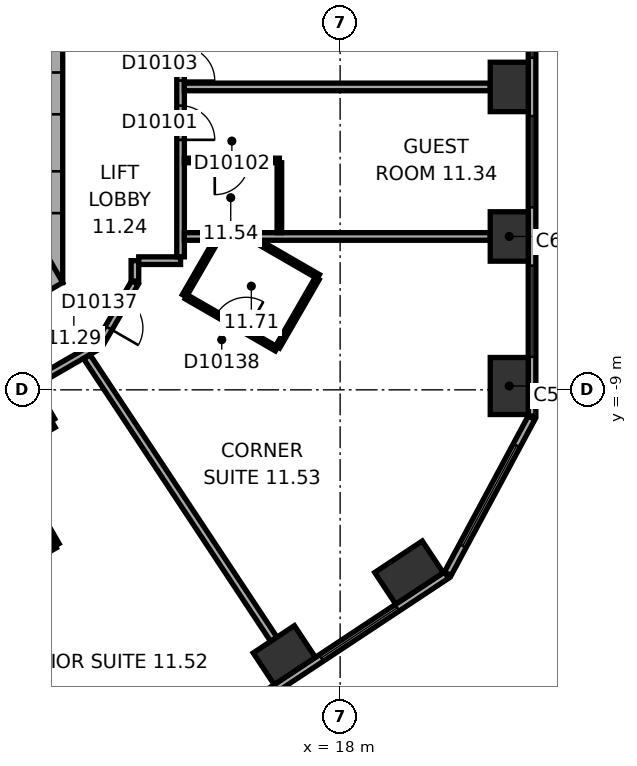
"""IFC4 building model, lengths in metres.
Left out: names, types, materials, properties, quantities, classifications, styles, units other than length and angle.
Written with IfcOpenShell. Run it as: python <this file> out.ifc"""

import sys

from ifc_helpers import new_model, si_unit, direction, frame, frame_2d, origin, origin_2d, place, context, subcontext, project, spatial, rectangle, extrude, element, fill, save


model = new_model("IFC4")
c1 = context("Model", 3, precision=1e-05, world=origin(), true_north=direction((0.0, 1.0)))
c2 = subcontext(c1, "Body", "Model", "MODEL_VIEW")
j1 = project(units=[si_unit("LENGTHUNIT", "METRE"), si_unit("PLANEANGLEUNIT", "RADIAN")], contexts=[c1])
p1 = place(None, origin())
s1 = spatial("IfcSite", under=j1, at=p1, CompositionType="ELEMENT")
p2 = place(p1, origin())
s2 = spatial("IfcBuilding", under=s1, at=p2, CompositionType="ELEMENT")
p3 = place(p2, frame((0.0, 0.0, 57.2)))
s3 = spatial("IfcBuildingStorey", under=s2, at=p3, CompositionType="ELEMENT", Elevation=57.2)
p4 = place(p3, frame((22.45, -8.899, 0.0), z_axis=(0.0, 0.0, 1.0), x_axis=(0.0, 1.0, 0.0)))
e1 = element("IfcColumn", 1, at=p4, inside=s3, PredefinedType="COLUMN", context=c2, shape_type="SweptSolid", body=[
    extrude(rectangle(XDim=1.5, YDim=1.0, at=origin_2d()), origin(), (0.0, 0.0, 1.0), 3.3),
])
for number, where, z_axis, x_axis in (
    (2, (22.45, -4.965, 0.0), (0.0, 0.0, 1.0), (0.0, 1.0, 0.0)),
    (3, (22.45, -1.03, 0.0), (0.0, 0.0, 1.0), (0.0, 1.0, 0.0)),
    (4, (16.531, -15.981, 0.0), (0.0, 0.0, 1.0), (0.834, 0.552, 0.0)),
):
    element("IfcColumn", number, at=place(p3, frame(where, z_axis=z_axis, x_axis=x_axis)), inside=s3, PredefinedType="COLUMN", context=c2, shape_type="SweptSolid", body=[
        extrude(rectangle(XDim=1.3, YDim=1.0, at=origin_2d()), origin(), (0.0, 0.0, 1.0), 3.3),
    ])
p5 = place(p3, frame((19.812, -13.809, 0.0), z_axis=(0.0, 0.0, 1.0), x_axis=(0.833885822067, 0.551936985312, 0.0)))
e5 = element("IfcColumn", 5, at=p5, inside=s3, PredefinedType="COLUMN", context=c2, shape_type="SweptSolid", body=[
    extrude(rectangle(XDim=1.5, YDim=1.0, at=origin_2d()), origin(), (0.0, 0.0, 1.0), 3.3),
])
p6 = place(p3, frame((10.1, -6.177, 0.0), z_axis=(0.0, 0.0, 1.0), x_axis=(0.0, 1.0, 0.0)))
e6 = element("IfcWall", 6, at=p6, inside=s3, PredefinedType="SHEAR", context=c2, shape_type="SweptSolid", body=[
    extrude(rectangle(XDim=12.355, YDim=1.2, at=frame_2d((6.177, 0.0))), origin(), (0.0, 0.0, 1.0), 3.3),
])
p7 = place(p6, frame((6.378, 0.0, 0.0)))
e7 = element("IfcOpeningElement", 7, at=p7, cuts=e6, PredefinedType="OPENING", context=c2, shape_type="SweptSolid", body=[
    extrude(rectangle(XDim=1.5, YDim=2.1, at=frame_2d((0.75, 1.05))), frame((0.0, 0.61, 0.0), z_axis=(0.0, -1.0, 0.0), x_axis=(1.0, 0.0, 0.0)), (0.0, 0.0, 1.0), 1.22),
])
p8 = place(p6, frame((1.828, 0.0, 0.0)))
e8 = element("IfcOpeningElement", 8, at=p8, cuts=e6, PredefinedType="OPENING", context=c2, shape_type="SweptSolid", body=[
    extrude(rectangle(XDim=1.1, YDim=2.1, at=frame_2d((0.55, 1.05))), frame((0.0, 0.61, 0.0), z_axis=(0.0, -1.0, 0.0), x_axis=(1.0, 0.0, 0.0)), (0.0, 0.0, 1.0), 1.22),
])
p9 = place(p6, frame((4.427, 0.0, 0.0)))
e9 = element("IfcOpeningElement", 9, at=p9, cuts=e6, PredefinedType="OPENING", context=c2, shape_type="SweptSolid", body=[
    extrude(rectangle(XDim=1.1, YDim=2.1, at=frame_2d((0.55, 1.05))), frame((0.0, 0.61, 0.0), z_axis=(0.0, -1.0, 0.0), x_axis=(1.0, 0.0, 0.0)), (0.0, 0.0, 1.0), 1.22),
])
p10 = place(p3, frame((-0.3, -11.836, 0.0), z_axis=(0.0, 0.0, 1.0), x_axis=(0.866021384402, 0.500006961711, 0.0)))
e10 = element("IfcWall", 10, at=p10, inside=s3, PredefinedType="SHEAR", context=c2, shape_type="SweptSolid", body=[
    extrude(rectangle(XDim=12.355, YDim=1.2, at=frame_2d((6.178, 0.0))), origin(), (0.0, 0.0, 1.0), 3.3),
])
p11 = place(p10, frame((4.128, 0.0, 0.0)))
e11 = element("IfcOpeningElement", 11, at=p11, cuts=e10, PredefinedType="OPENING", context=c2, shape_type="SweptSolid", body=[
    extrude(rectangle(XDim=0.9, YDim=2.1, at=frame_2d((0.45, 1.05))), frame((0.0, 0.61, 0.0), z_axis=(0.0, -1.0, 0.0), x_axis=(1.0, 0.0, 0.0)), (0.0, 0.0, 1.0), 1.22),
])
p12 = place(p10, frame((7.928, 0.0, 0.0)))
e12 = element("IfcOpeningElement", 12, at=p12, cuts=e10, PredefinedType="OPENING", context=c2, shape_type="SweptSolid", body=[
    extrude(rectangle(XDim=1.1, YDim=2.1, at=frame_2d((0.55, 1.05))), frame((0.0, 0.61, 0.0), z_axis=(0.0, -1.0, 0.0), x_axis=(1.0, 0.0, 0.0)), (0.0, 0.0, 1.0), 1.22),
])
p13 = place(p3, frame((23.05, -9.687, 0.0), z_axis=(0.0, 0.0, 1.0), x_axis=(0.0, 1.0, 0.0)))
e13 = element("IfcWall", 13, at=p13, inside=s3, PredefinedType="STANDARD", context=c2, shape_type="SweptSolid", body=[
    extrude(rectangle(XDim=21.246, YDim=0.2, at=frame_2d((10.623, 0.0))), origin(), (0.0, 0.0, 1.0), 3.3),
])
p14 = place(p13, frame((1.555, 0.0, 0.8)))
e14 = element("IfcOpeningElement", 14, at=p14, cuts=e13, PredefinedType="OPENING", context=c2, shape_type="SweptSolid", body=[
    extrude(rectangle(XDim=2.4, YDim=1.7, at=frame_2d((1.2, 0.85))), frame((0.0, 0.11, 0.0), z_axis=(0.0, -1.0, 0.0), x_axis=(1.0, 0.0, 0.0)), (0.0, 0.0, 1.0), 0.22),
])
p15 = place(p13, frame((5.489, 0.0, 0.8)))
e15 = element("IfcOpeningElement", 15, at=p15, cuts=e13, PredefinedType="OPENING", context=c2, shape_type="SweptSolid", body=[
    extrude(rectangle(XDim=2.4, YDim=1.7, at=frame_2d((1.2, 0.85))), frame((0.0, 0.11, 0.0), z_axis=(0.0, -1.0, 0.0), x_axis=(1.0, 0.0, 0.0)), (0.0, 0.0, 1.0), 0.22),
])
p16 = place(p13, frame((9.424, 0.0, 0.8)))
e16 = element("IfcOpeningElement", 16, at=p16, cuts=e13, PredefinedType="OPENING", context=c2, shape_type="SweptSolid", body=[
    extrude(rectangle(XDim=2.4, YDim=1.7, at=frame_2d((1.2, 0.85))), frame((0.0, 0.11, 0.0), z_axis=(0.0, -1.0, 0.0), x_axis=(1.0, 0.0, 0.0)), (0.0, 0.0, 1.0), 0.22),
])
p17 = place(p13, frame((13.358, 0.0, 0.8)))
e17 = element("IfcOpeningElement", 17, at=p17, cuts=e13, PredefinedType="OPENING", context=c2, shape_type="SweptSolid", body=[
    extrude(rectangle(XDim=2.4, YDim=1.7, at=frame_2d((1.2, 0.85))), frame((0.0, 0.11, 0.0), z_axis=(0.0, -1.0, 0.0), x_axis=(1.0, 0.0, 0.0)), (0.0, 0.0, 1.0), 0.22),
])
p18 = place(p13, frame((17.293, 0.0, 0.8)))
e18 = element("IfcOpeningElement", 18, at=p18, cuts=e13, PredefinedType="OPENING", context=c2, shape_type="SweptSolid", body=[
    extrude(rectangle(XDim=2.4, YDim=1.7, at=frame_2d((1.2, 0.85))), frame((0.0, 0.11, 0.0), z_axis=(0.0, -1.0, 0.0), x_axis=(1.0, 0.0, 0.0)), (0.0, 0.0, 1.0), 0.22),
])
p19 = place(p3, frame((3.083, -25.601, 0.0), z_axis=(0.0, 0.0, 1.0), x_axis=(0.833884295743, 0.551939291329, 0.0)))
e19 = element("IfcWall", 19, at=p19, inside=s3, PredefinedType="STANDARD", context=c2, shape_type="SweptSolid", body=[
    extrude(rectangle(XDim=21.246, YDim=0.2, at=frame_2d((10.623, 0.0))), origin(), (0.0, 0.0, 1.0), 3.3),
])
p20 = place(p19, frame((1.553, 0.0, 0.8)))
e20 = element("IfcOpeningElement", 20, at=p20, cuts=e19, PredefinedType="OPENING", context=c2, shape_type="SweptSolid", body=[
    extrude(rectangle(XDim=2.4, YDim=1.7, at=frame_2d((1.2, 0.85))), frame((0.0, 0.11, 0.0), z_axis=(0.0, -1.0, 0.0), x_axis=(1.0, 0.0, 0.0)), (0.0, 0.0, 1.0), 0.22),
])
p21 = place(p19, frame((5.488, 0.0, 0.8)))
e21 = element("IfcOpeningElement", 21, at=p21, cuts=e19, PredefinedType="OPENING", context=c2, shape_type="SweptSolid", body=[
    extrude(rectangle(XDim=2.4, YDim=1.7, at=frame_2d((1.2, 0.85))), frame((0.0, 0.11, 0.0), z_axis=(0.0, -1.0, 0.0), x_axis=(1.0, 0.0, 0.0)), (0.0, 0.0, 1.0), 0.22),
])
p22 = place(p19, frame((9.422, 0.0, 0.8)))
e22 = element("IfcOpeningElement", 22, at=p22, cuts=e19, PredefinedType="OPENING", context=c2, shape_type="SweptSolid", body=[
    extrude(rectangle(XDim=2.4, YDim=1.7, at=frame_2d((1.2, 0.85))), frame((0.0, 0.11, 0.0), z_axis=(0.0, -1.0, 0.0), x_axis=(1.0, 0.0, 0.0)), (0.0, 0.0, 1.0), 0.22),
])
p23 = place(p19, frame((13.357, 0.0, 0.8)))
e23 = element("IfcOpeningElement", 23, at=p23, cuts=e19, PredefinedType="OPENING", context=c2, shape_type="SweptSolid", body=[
    extrude(rectangle(XDim=2.4, YDim=1.7, at=frame_2d((1.2, 0.85))), frame((0.0, 0.11, 0.0), z_axis=(0.0, -1.0, 0.0), x_axis=(1.0, 0.0, 0.0)), (0.0, 0.0, 1.0), 0.22),
])
p24 = place(p19, frame((17.291, 0.0, 0.8)))
e24 = element("IfcOpeningElement", 24, at=p24, cuts=e19, PredefinedType="OPENING", context=c2, shape_type="SweptSolid", body=[
    extrude(rectangle(XDim=2.4, YDim=1.7, at=frame_2d((1.2, 0.85))), frame((0.0, 0.11, 0.0), z_axis=(0.0, -1.0, 0.0), x_axis=(1.0, 0.0, 0.0)), (0.0, 0.0, 1.0), 0.22),
])
p25 = place(p3, frame((20.833, -13.839, 0.0), z_axis=(0.0, 0.0, 1.0), x_axis=(0.473321668581, 0.880889662813, 0.0)))
e25 = element("IfcWall", 25, at=p25, inside=s3, PredefinedType="STANDARD", context=c2, shape_type="SweptSolid", body=[
    extrude(rectangle(XDim=4.66, YDim=0.2, at=frame_2d((2.33, 0.0))), origin(), (0.0, 0.0, 1.0), 3.3),
])
p26 = place(p25, frame((0.83, 0.0, 0.8)))
e26 = element("IfcOpeningElement", 26, at=p26, cuts=e25, PredefinedType="OPENING", context=c2, shape_type="SweptSolid", body=[
    extrude(rectangle(XDim=3.0, YDim=1.7, at=frame_2d((1.5, 0.85))), frame((0.0, 0.11, 0.0), z_axis=(0.0, -1.0, 0.0), x_axis=(1.0, 0.0, 0.0)), (0.0, 0.0, 1.0), 0.22),
])
p27 = place(p3, frame((7.385, -11.673, 0.0), z_axis=(0.0, 0.0, 1.0), x_axis=(0.866037524642, 0.499979005472, 0.0)))
e27 = element("IfcWall", 27, at=p27, inside=s3, PredefinedType="PARTITIONING", context=c2, shape_type="SweptSolid", body=[
    extrude(rectangle(XDim=3.542, YDim=0.2, at=frame_2d((1.771, 0.0))), origin(), (0.0, 0.0, 1.0), 3.05),
])
p28 = place(p3, frame((9.203, -10.738, 0.0), z_axis=(0.0, 0.0, 1.0), x_axis=(0.50000943426, -0.866019956843, 0.0)))
e28 = element("IfcWall", 28, at=p28, inside=s3, PredefinedType="PARTITIONING", context=c2, shape_type="SweptSolid", body=[
    extrude(rectangle(XDim=2.7, YDim=0.12, at=frame_2d((1.35, 0.0))), origin(), (0.0, 0.0, 1.0), 3.05),
])
p29 = place(p3, frame((9.852, -8.861, 0.0), z_axis=(0.0, 0.0, 1.0), x_axis=(0.866013291437, 0.500020978615, 0.0)))
e29 = element("IfcWall", 29, at=p29, inside=s3, PredefinedType="PARTITIONING", context=c2, shape_type="SweptSolid", body=[
    extrude(rectangle(XDim=2.077, YDim=0.2, at=frame_2d((1.038, 0.0))), origin(), (0.0, 0.0, 1.0), 3.05),
])
p30 = place(p3, frame((10.402, -9.815, 0.0), z_axis=(0.0, 0.0, 1.0), x_axis=(-0.499968756647, 0.866043441391, 0.0)))
e30 = element("IfcWall", 30, at=p30, inside=s3, PredefinedType="PARTITIONING", context=c2, shape_type="SweptSolid", body=[
    extrude(rectangle(XDim=1.001, YDim=0.2, at=frame_2d((0.5, 0.0))), origin(), (0.0, 0.0, 1.0), 3.05),
])
p31 = place(p3, frame((10.501, -13.106, 0.0), z_axis=(0.0, 0.0, 1.0), x_axis=(-0.866013262469, -0.500021028785, 0.0)))
e31 = element("IfcWall", 31, at=p31, inside=s3, PredefinedType="PARTITIONING", context=c2, shape_type="SweptSolid", body=[
    extrude(rectangle(XDim=1.982, YDim=0.12, at=frame_2d((0.991, 0.0))), origin(), (0.0, 0.0, 1.0), 3.05),
])
p32 = place(p3, frame((11.67, -7.788, 0.0), z_axis=(0.0, 0.0, 1.0), x_axis=(0.500063286585, 0.865988862174, 0.0)))
e32 = element("IfcWall", 32, at=p32, inside=s3, PredefinedType="PARTITIONING", context=c2, shape_type="SweptSolid", body=[
    extrude(rectangle(XDim=1.86, YDim=0.2, at=frame_2d((0.93, 0.0))), origin(), (0.0, 0.0, 1.0), 3.05),
])
p33 = place(p32, frame((0.48, 0.0, 0.0)))
e33 = element("IfcOpeningElement", 33, at=p33, cuts=e32, PredefinedType="OPENING", context=c2, shape_type="SweptSolid", body=[
    extrude(rectangle(XDim=0.9, YDim=2.1, at=frame_2d((0.45, 1.05))), frame((0.0, 0.11, 0.0), z_axis=(0.0, -1.0, 0.0), x_axis=(1.0, 0.0, 0.0)), (0.0, 0.0, 1.0), 0.22),
])
p34 = place(p3, frame((12.6, -6.138, 0.0), z_axis=(0.0, 0.0, 1.0), x_axis=(0.0, 1.0, 0.0)))
e34 = element("IfcWall", 34, at=p34, inside=s3, PredefinedType="PARTITIONING", context=c2, shape_type="SweptSolid", body=[
    extrude(rectangle(XDim=0.537, YDim=0.2, at=frame_2d((0.268, 0.0))), origin(), (0.0, 0.0, 1.0), 3.05),
])
p35 = place(p3, frame((12.7, -5.601, 0.0), z_axis=(0.0, 0.0, 1.0), x_axis=(1.0, 0.0, 0.0)))
e35 = element("IfcWall", 35, at=p35, inside=s3, PredefinedType="PARTITIONING", context=c2, shape_type="SweptSolid", body=[
    extrude(rectangle(XDim=1.101, YDim=0.2, at=frame_2d((0.551, 0.0))), origin(), (0.0, 0.0, 1.0), 3.05),
])
p36 = place(p3, frame((13.801, -5.501, 0.0), z_axis=(0.0, 0.0, 1.0), x_axis=(0.0, 1.0, 0.0)))
e36 = element("IfcWall", 36, at=p36, inside=s3, PredefinedType="PARTITIONING", context=c2, shape_type="SweptSolid", body=[
    extrude(rectangle(XDim=5.702, YDim=0.2, at=frame_2d((2.851, 0.0))), origin(), (0.0, 0.0, 1.0), 3.05),
])
p37 = place(p36, frame((3.079, 0.0, 0.0)))
e37 = element("IfcOpeningElement", 37, at=p37, cuts=e36, PredefinedType="OPENING", context=c2, shape_type="SweptSolid", body=[
    extrude(rectangle(XDim=0.9, YDim=2.1, at=frame_2d((0.45, 1.05))), frame((0.0, 0.11, 0.0), z_axis=(0.0, -1.0, 0.0), x_axis=(1.0, 0.0, 0.0)), (0.0, 0.0, 1.0), 0.22),
])
p38 = place(p36, frame((4.636, 0.0, 0.0)))
e38 = element("IfcOpeningElement", 38, at=p38, cuts=e36, PredefinedType="OPENING", context=c2, shape_type="SweptSolid", body=[
    extrude(rectangle(XDim=0.9, YDim=2.1, at=frame_2d((0.45, 1.05))), frame((0.0, 0.11, 0.0), z_axis=(0.0, -1.0, 0.0), x_axis=(1.0, 0.0, 0.0)), (0.0, 0.0, 1.0), 0.22),
])
p39 = place(p3, frame((13.901, -6.524, 0.0), z_axis=(0.0, 0.0, 1.0), x_axis=(0.499964162598, 0.86604609353, 0.0)))
e39 = element("IfcWall", 39, at=p39, inside=s3, PredefinedType="PARTITIONING", context=c2, shape_type="SweptSolid", body=[
    extrude(rectangle(XDim=1.661, YDim=0.12, at=frame_2d((0.831, 0.0))), origin(), (0.0, 0.0, 1.0), 3.05),
])
p40 = place(p3, frame((13.901, -4.965, 0.0), z_axis=(0.0, 0.0, 1.0), x_axis=(1.0, 0.0, 0.0)))
e40 = element("IfcWall", 40, at=p40, inside=s3, PredefinedType="PARTITIONING", context=c2, shape_type="SweptSolid", body=[
    extrude(rectangle(XDim=8.049, YDim=0.2, at=frame_2d((4.024, 0.0))), origin(), (0.0, 0.0, 1.0), 3.05),
])
p41 = place(p3, frame((13.901, -2.965, 0.0), z_axis=(0.0, 0.0, 1.0), x_axis=(1.0, 0.0, 0.0)))
e41 = element("IfcWall", 41, at=p41, inside=s3, PredefinedType="PARTITIONING", context=c2, shape_type="SweptSolid", body=[
    extrude(rectangle(XDim=2.5, YDim=0.12, at=frame_2d((1.25, 0.0))), origin(), (0.0, 0.0, 1.0), 3.05),
])
p42 = place(p41, frame((0.8, 0.0, 0.0)))
e42 = element("IfcOpeningElement", 42, at=p42, cuts=e41, PredefinedType="OPENING", context=c2, shape_type="SweptSolid", body=[
    extrude(rectangle(XDim=0.9, YDim=2.1, at=frame_2d((0.45, 1.05))), frame((0.0, 0.07, 0.0), z_axis=(0.0, -1.0, 0.0), x_axis=(1.0, 0.0, 0.0)), (0.0, 0.0, 1.0), 0.14),
])
p43 = place(p3, frame((15.841, -5.104, 0.0), z_axis=(0.0, 0.0, 1.0), x_axis=(0.866025591402, -0.499999675036, 0.0)))
e43 = element("IfcWall", 43, at=p43, inside=s3, PredefinedType="PARTITIONING", context=c2, shape_type="SweptSolid", body=[
    extrude(rectangle(XDim=1.83, YDim=0.12, at=frame_2d((0.915, 0.0))), origin(), (0.0, 0.0, 1.0), 3.05),
])
p44 = place(p3, frame((16.255, -15.564, 0.0), z_axis=(0.0, 0.0, 1.0), x_axis=(-0.55192208744, 0.833895682562, 0.0)))
e44 = element("IfcWall", 44, at=p44, inside=s3, PredefinedType="PARTITIONING", context=c2, shape_type="SweptSolid", body=[
    extrude(rectangle(XDim=8.913, YDim=0.2, at=frame_2d((4.457, 0.0))), origin(), (0.0, 0.0, 1.0), 2.6),
])
p45 = place(p3, frame((16.326, -7.925, 0.0), z_axis=(0.0, 0.0, 1.0), x_axis=(-0.865997131366, 0.500048966069, 0.0)))
e45 = element("IfcWall", 45, at=p45, inside=s3, PredefinedType="PARTITIONING", context=c2, shape_type="SweptSolid", body=[
    extrude(rectangle(XDim=2.74, YDim=0.12, at=frame_2d((1.37, 0.0))), origin(), (0.0, 0.0, 1.0), 3.05),
])
p46 = place(p45, frame((0.92, 0.0, 0.0)))
e46 = element("IfcOpeningElement", 46, at=p46, cuts=e45, PredefinedType="OPENING", context=c2, shape_type="SweptSolid", body=[
    extrude(rectangle(XDim=0.9, YDim=2.1, at=frame_2d((0.45, 1.05))), frame((0.0, 0.07, 0.0), z_axis=(0.0, -1.0, 0.0), x_axis=(1.0, 0.0, 0.0)), (0.0, 0.0, 1.0), 0.14),
])
p47 = place(p3, frame((16.401, -3.025, 0.0), z_axis=(0.0, 0.0, 1.0), x_axis=(0.0, -1.0, 0.0)))
e47 = element("IfcWall", 47, at=p47, inside=s3, PredefinedType="PARTITIONING", context=c2, shape_type="SweptSolid", body=[
    extrude(rectangle(XDim=1.84, YDim=0.12, at=frame_2d((0.92, 0.0))), origin(), (0.0, 0.0, 1.0), 3.05),
])
p48 = place(p3, frame((17.396, -6.071, 0.0), z_axis=(0.0, 0.0, 1.0), x_axis=(-0.500027264788, -0.866009661879, 0.0)))
e48 = element("IfcWall", 48, at=p48, inside=s3, PredefinedType="PARTITIONING", context=c2, shape_type="SweptSolid", body=[
    extrude(rectangle(XDim=2.08, YDim=0.12, at=frame_2d((1.04, 0.0))), origin(), (0.0, 0.0, 1.0), 3.05),
])
p49 = place(p3, frame((21.95, -1.03, 0.0), z_axis=(0.0, 0.0, 1.0), x_axis=(-1.0, 0.0, 0.0)))
e49 = element("IfcWall", 49, at=p49, inside=s3, PredefinedType="PARTITIONING", context=c2, shape_type="SweptSolid", body=[
    extrude(rectangle(XDim=8.049, YDim=0.2, at=frame_2d((4.024, 0.0))), origin(), (0.0, 0.0, 1.0), 2.6),
])
p50 = place(p14, origin())
e50 = element("IfcWindow", 50, at=p50, inside=s3, PartitioningType="SINGLE_PANEL", PredefinedType="WINDOW", context=c2, shape_type="SweptSolid", body=[
    extrude(rectangle(XDim=2.4, YDim=1.7, at=frame_2d((1.2, 0.85))), frame((0.0, 0.03, 0.0), z_axis=(0.0, -1.0, 0.0), x_axis=(1.0, 0.0, 0.0)), (0.0, 0.0, 1.0), 0.06),
])
fill(e14, e50)
p51 = place(p15, origin())
e51 = element("IfcWindow", 51, at=p51, inside=s3, PartitioningType="SINGLE_PANEL", PredefinedType="WINDOW", context=c2, shape_type="SweptSolid", body=[
    extrude(rectangle(XDim=2.4, YDim=1.7, at=frame_2d((1.2, 0.85))), frame((0.0, 0.03, 0.0), z_axis=(0.0, -1.0, 0.0), x_axis=(1.0, 0.0, 0.0)), (0.0, 0.0, 1.0), 0.06),
])
fill(e15, e51)
p52 = place(p16, origin())
e52 = element("IfcWindow", 52, at=p52, inside=s3, PartitioningType="SINGLE_PANEL", PredefinedType="WINDOW", context=c2, shape_type="SweptSolid", body=[
    extrude(rectangle(XDim=2.4, YDim=1.7, at=frame_2d((1.2, 0.85))), frame((0.0, 0.03, 0.0), z_axis=(0.0, -1.0, 0.0), x_axis=(1.0, 0.0, 0.0)), (0.0, 0.0, 1.0), 0.06),
])
fill(e16, e52)
p53 = place(p24, origin())
e53 = element("IfcWindow", 53, at=p53, inside=s3, PartitioningType="SINGLE_PANEL", PredefinedType="WINDOW", context=c2, shape_type="SweptSolid", body=[
    extrude(rectangle(XDim=2.4, YDim=1.7, at=frame_2d((1.2, 0.85))), frame((0.0, 0.03, 0.0), z_axis=(0.0, -1.0, 0.0), x_axis=(1.0, 0.0, 0.0)), (0.0, 0.0, 1.0), 0.06),
])
fill(e24, e53)
p54 = place(p26, origin())
e54 = element("IfcWindow", 54, at=p54, inside=s3, PartitioningType="SINGLE_PANEL", PredefinedType="WINDOW", context=c2, shape_type="SweptSolid", body=[
    extrude(rectangle(XDim=3.0, YDim=1.7, at=frame_2d((1.5, 0.85))), frame((0.0, 0.03, 0.0), z_axis=(0.0, -1.0, 0.0), x_axis=(1.0, 0.0, 0.0)), (0.0, 0.0, 1.0), 0.06),
])
fill(e26, e54)
p55 = place(p37, origin())
e55 = element("IfcDoor", 55, at=p55, inside=s3, OperationType="SINGLE_SWING_LEFT", PredefinedType="DOOR", context=c2, shape_type="SweptSolid", body=[
    extrude(rectangle(XDim=0.9, YDim=2.1, at=frame_2d((0.45, 1.05))), frame((0.0, 0.025, 0.0), z_axis=(0.0, -1.0, 0.0), x_axis=(1.0, 0.0, 0.0)), (0.0, 0.0, 1.0), 0.05),
])
fill(e37, e55)
p56 = place(p42, origin())
e56 = element("IfcDoor", 56, at=p56, inside=s3, OperationType="SINGLE_SWING_LEFT", PredefinedType="DOOR", context=c2, shape_type="SweptSolid", body=[
    extrude(rectangle(XDim=0.9, YDim=2.1, at=frame_2d((0.45, 1.05))), frame((0.0, 0.025, 0.0), z_axis=(0.0, -1.0, 0.0), x_axis=(1.0, 0.0, 0.0)), (0.0, 0.0, 1.0), 0.05),
])
fill(e42, e56)
p57 = place(p38, origin())
e57 = element("IfcDoor", 57, at=p57, inside=s3, OperationType="SINGLE_SWING_LEFT", PredefinedType="DOOR", context=c2, shape_type="SweptSolid", body=[
    extrude(rectangle(XDim=0.9, YDim=2.1, at=frame_2d((0.45, 1.05))), frame((0.0, 0.025, 0.0), z_axis=(0.0, -1.0, 0.0), x_axis=(1.0, 0.0, 0.0)), (0.0, 0.0, 1.0), 0.05),
])
fill(e38, e57)
p58 = place(p33, origin())
e58 = element("IfcDoor", 58, at=p58, inside=s3, OperationType="SINGLE_SWING_LEFT", PredefinedType="DOOR", context=c2, shape_type="SweptSolid", body=[
    extrude(rectangle(XDim=0.9, YDim=2.1, at=frame_2d((0.45, 1.05))), frame((0.0, 0.025, 0.0), z_axis=(0.0, -1.0, 0.0), x_axis=(1.0, 0.0, 0.0)), (0.0, 0.0, 1.0), 0.05),
])
fill(e33, e58)
p59 = place(p46, origin())
e59 = element("IfcDoor", 59, at=p59, inside=s3, OperationType="SINGLE_SWING_LEFT", PredefinedType="DOOR", context=c2, shape_type="SweptSolid", body=[
    extrude(rectangle(XDim=0.9, YDim=2.1, at=frame_2d((0.45, 1.05))), frame((0.0, 0.025, 0.0), z_axis=(0.0, -1.0, 0.0), x_axis=(1.0, 0.0, 0.0)), (0.0, 0.0, 1.0), 0.05),
])
fill(e46, e59)
save(model, sys.argv[1])
